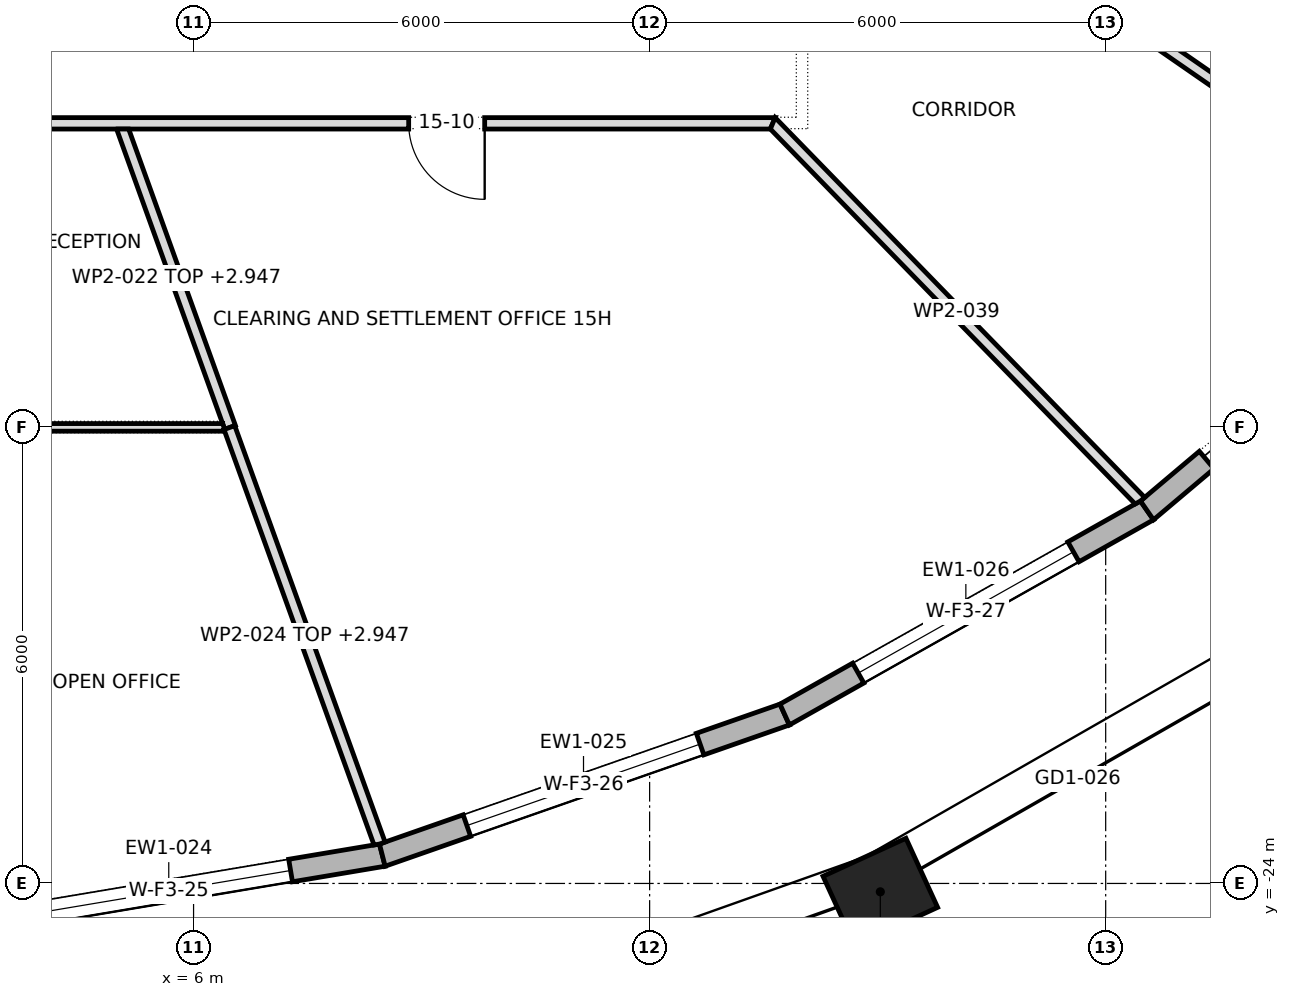
"""IFC4 building model, lengths in metres.
Left out: names, types, materials, properties, quantities, classifications, styles, units other than length and angle.
Written with IfcOpenShell. Run it as: python <this file> out.ifc"""

import sys

from ifc_helpers import new_model, si_unit, direction, frame, frame_2d, origin, origin_2d, place, context, subcontext, project, spatial, polyline, rectangle, outline, extrude, element, fill, save


model = new_model("IFC4")
c1 = context("Model", 3, precision=1e-05, world=origin(), true_north=direction((0.0, 1.0)))
c2 = subcontext(c1, "Body", "Model", "MODEL_VIEW")
j1 = project(units=[si_unit("LENGTHUNIT", "METRE"), si_unit("PLANEANGLEUNIT", "RADIAN")], contexts=[c1])
p1 = place(None, origin())
s1 = spatial("IfcSite", under=j1, at=p1, CompositionType="ELEMENT")
p2 = place(p1, origin())
s2 = spatial("IfcBuilding", under=s1, at=p2, CompositionType="ELEMENT")
p3 = place(p2, frame((0.0, 0.0, 214.9)))
s3 = spatial("IfcBuildingStorey", under=s2, at=p3, CompositionType="ELEMENT", Elevation=214.9)
p4 = place(p3, frame((15.035, -24.11, 0.0), z_axis=(0.0, 0.0, 1.0), x_axis=(0.909129276708, 0.416514055265, 0.0)))
e1 = element("IfcColumn", 1, at=p4, inside=s3, PredefinedType="COLUMN", context=c2, shape_type="SweptSolid", body=[
    extrude(rectangle(XDim=1.2, YDim=1.0, at=origin_2d()), origin(), (0.0, 0.0, 1.0), 4.0),
])
p5 = place(p3, frame((2.864, -24.57, 0.0), z_axis=(0.0, 0.0, 1.0), x_axis=(0.986218486863, 0.16544816762, 0.0)))
e2 = element("IfcWall", 2, at=p5, inside=s3, PredefinedType="STANDARD", context=c2, shape_type="SweptSolid", body=[
    extrude(outline(polyline([(-0.012, -0.15), (5.71, -0.15), (5.685, 0.15), (0.012, 0.15), (-0.012, -0.15)])), origin(), (0.0, 0.0, 1.0), 3.7),
])
p6 = place(p5, frame((1.224, 0.0, 0.6)))
e3 = element("IfcOpeningElement", 3, at=p6, cuts=e2, PredefinedType="OPENING", context=c2, shape_type="SweptSolid", body=[
    extrude(rectangle(XDim=3.25, YDim=2.65, at=frame_2d((1.625, 1.325))), frame((0.0, 0.162, 0.0), z_axis=(0.0, -1.0, 0.0), x_axis=(1.0, 0.0, 0.0)), (0.0, 0.0, 1.0), 0.324),
])
p7 = place(p3, frame((8.483, -23.627, 0.0), z_axis=(0.0, 0.0, 1.0), x_axis=(0.944053670735, 0.329791853708, 0.0)))
e4 = element("IfcWall", 4, at=p7, inside=s3, PredefinedType="STANDARD", context=c2, shape_type="SweptSolid", body=[
    extrude(outline(polyline([(-0.013, -0.15), (5.621, -0.15), (5.594, 0.15), (0.013, 0.15), (-0.013, -0.15)])), origin(), (0.0, 0.0, 1.0), 3.7),
])
p8 = place(p7, frame((1.179, 0.0, 0.6)))
e5 = element("IfcOpeningElement", 5, at=p8, cuts=e4, PredefinedType="OPENING", context=c2, shape_type="SweptSolid", body=[
    extrude(rectangle(XDim=3.25, YDim=2.65, at=frame_2d((1.625, 1.325))), frame((0.0, 0.162, 0.0), z_axis=(0.0, -1.0, 0.0), x_axis=(1.0, 0.0, 0.0)), (0.0, 0.0, 1.0), 0.324),
])
p9 = place(p3, frame((13.777, -21.778, 0.0), z_axis=(0.0, 0.0, 1.0), x_axis=(0.871207038577, 0.490915772749, 0.0)))
e6 = element("IfcWall", 6, at=p9, inside=s3, PredefinedType="STANDARD", context=c2, shape_type="SweptSolid", body=[
    extrude(outline(polyline([(-0.013, -0.15), (5.485, -0.15), (5.457, 0.15), (0.013, 0.15), (-0.013, -0.15)])), origin(), (0.0, 0.0, 1.0), 3.7),
])
p10 = place(p9, frame((1.111, 0.0, 0.6)))
e7 = element("IfcOpeningElement", 7, at=p10, cuts=e6, PredefinedType="OPENING", context=c2, shape_type="SweptSolid", body=[
    extrude(rectangle(XDim=3.25, YDim=2.65, at=frame_2d((1.625, 1.325))), frame((0.0, 0.162, 0.0), z_axis=(0.0, -1.0, 0.0), x_axis=(1.0, 0.0, 0.0)), (0.0, 0.0, 1.0), 0.324),
])
p11 = place(p3, frame((18.543, -19.092, 0.0), z_axis=(0.0, 0.0, 1.0), x_axis=(0.764397795062, 0.644744919255, 0.0)))
e8 = element("IfcWall", 8, at=p11, inside=s3, PredefinedType="STANDARD", context=c2, shape_type="SweptSolid", body=[
    extrude(outline(polyline([(-0.014, -0.15), (5.32, -0.15), (5.29, 0.15), (0.014, 0.15), (-0.014, -0.15)])), origin(), (0.0, 0.0, 1.0), 3.7),
])
p12 = place(p11, frame((1.028, 0.0, 0.0)))
e9 = element("IfcOpeningElement", 9, at=p12, cuts=e8, PredefinedType="OPENING", context=c2, shape_type="SweptSolid", body=[
    extrude(rectangle(XDim=3.25, YDim=3.25, at=frame_2d((1.625, 1.625))), frame((0.0, 0.162, 0.0), z_axis=(0.0, -1.0, 0.0), x_axis=(1.0, 0.0, 0.0)), (0.0, 0.0, 1.0), 0.324),
])
p13 = place(p3, frame((-13.652, -14.0, 0.0), z_axis=(0.0, 0.0, 1.0), x_axis=(1.0, 0.0, 0.0)))
e10 = element("IfcWall", 10, at=p13, inside=s3, PredefinedType="PARTITIONING", context=c2, shape_type="SweptSolid", body=[
    extrude(outline(polyline([(0.063, -0.075), (2.004, -0.075), (3.946, -0.075), (5.887, -0.075), (7.828, -0.075), (9.769, -0.075), (11.71, -0.075), (13.652, -0.075), (15.593, -0.075), (17.534, -0.075), (19.475, -0.075), (21.417, -0.075), (23.358, -0.075), (25.299, -0.075), (27.24, -0.075), (27.303, 0.075), (27.303, 0.075), (25.353, 0.075), (23.403, 0.075), (21.453, 0.075), (19.502, 0.075), (17.552, 0.075), (15.602, 0.075), (13.652, 0.075), (11.701, 0.075), (9.751, 0.075), (7.801, 0.075), (5.851, 0.075), (3.9, 0.075), (1.95, 0.075), (0.0, 0.075), (0.0, 0.075), (0.063, -0.075)])), origin(), (0.0, 0.0, 1.0), 3.7),
])
p14 = place(p13, frame((5.527, 0.0, 0.0)))
e11 = element("IfcOpeningElement", 11, at=p14, cuts=e10, PredefinedType="OPENING", context=c2, shape_type="SweptSolid", body=[
    extrude(rectangle(XDim=1.0, YDim=2.1, at=frame_2d((0.5, 1.05))), frame((0.0, 0.087, 0.0), z_axis=(0.0, -1.0, 0.0), x_axis=(1.0, 0.0, 0.0)), (0.0, 0.0, 1.0), 0.174),
])
p15 = place(p13, frame((14.857, 0.0, 0.0)))
e12 = element("IfcOpeningElement", 12, at=p15, cuts=e10, PredefinedType="OPENING", context=c2, shape_type="SweptSolid", body=[
    extrude(rectangle(XDim=1.0, YDim=2.1, at=frame_2d((0.5, 1.05))), frame((0.0, 0.087, 0.0), z_axis=(0.0, -1.0, 0.0), x_axis=(1.0, 0.0, 0.0)), (0.0, 0.0, 1.0), 0.174),
])
p16 = place(p13, frame((22.482, 0.0, 0.0)))
e13 = element("IfcOpeningElement", 13, at=p16, cuts=e10, PredefinedType="OPENING", context=c2, shape_type="SweptSolid", body=[
    extrude(rectangle(XDim=1.0, YDim=2.1, at=frame_2d((0.5, 1.05))), frame((0.0, 0.087, 0.0), z_axis=(0.0, -1.0, 0.0), x_axis=(1.0, 0.0, 0.0)), (0.0, 0.0, 1.0), 0.174),
])
p17 = place(p3, frame((5.058, -14.05, 0.0), z_axis=(0.0, 0.0, 1.0), x_axis=(0.338678283686, -0.940902237302, 0.0)))
e14 = element("IfcWall", 14, at=p17, inside=s3, PredefinedType="PARTITIONING", context=c2, shape_type="SweptSolid", body=[
    extrude(outline(polyline([(0.0, -0.075), (1.373, -0.075), (2.745, -0.075), (4.118, -0.075), (4.118, -0.075), (4.119, -0.075), (4.198, -0.075), (4.198, 0.075), (2.817, 0.075), (1.435, 0.075), (0.054, 0.075), (0.0, -0.074), (0.0, -0.075)])), origin(), (0.0, 0.0, 1.0), 2.947),
])
p18 = place(p3, frame((6.408, -18.0, 0.0), z_axis=(0.0, 0.0, 1.0), x_axis=(-1.0, 0.0, 0.0)))
e15 = element("IfcWall", 15, at=p18, inside=s3, PredefinedType="PARTITIONING", context=c2, shape_type="SweptSolid", body=[
    extrude(outline(polyline([(0.026, -0.05), (1.706, -0.05), (3.386, -0.05), (5.066, -0.05), (6.746, -0.05), (8.427, -0.05), (8.438, 0.047), (8.438, 0.05), (6.75, 0.05), (5.063, 0.05), (3.375, 0.05), (1.688, 0.05), (0.0, 0.05), (0.0, 0.049), (0.007, 0.03), (0.0, 0.028), (0.0, 0.021), (0.026, -0.05)])), origin(), (0.0, 0.0, 1.0), 3.7),
])
p19 = place(p18, frame((3.773, 0.0, 0.0)))
e16 = element("IfcOpeningElement", 16, at=p19, cuts=e15, PredefinedType="OPENING", context=c2, shape_type="SweptSolid", body=[
    extrude(rectangle(XDim=0.9, YDim=2.1, at=frame_2d((0.45, 1.05))), frame((0.0, 0.062, 0.0), z_axis=(0.0, -1.0, 0.0), x_axis=(1.0, 0.0, 0.0)), (0.0, 0.0, 1.0), 0.124),
])
p20 = place(p3, frame((6.471, -18.003, 0.0), z_axis=(0.0, 0.0, 1.0), x_axis=(0.339648584393, -0.940552411681, 0.0)))
e17 = element("IfcWall", 17, at=p20, inside=s3, PredefinedType="PARTITIONING", context=c2, shape_type="SweptSolid", body=[
    extrude(outline(polyline([(0.021, -0.075), (1.951, -0.075), (3.881, -0.075), (5.81, -0.075), (5.823, -0.004), (5.824, 0.043), (5.824, 0.075), (3.883, 0.075), (1.941, 0.075), (0.0, 0.075), (0.0, -0.067), (0.021, -0.075)])), origin(), (0.0, 0.0, 1.0), 2.947),
])
p21 = place(p3, frame((13.968, -9.667, 0.0), z_axis=(0.0, 0.0, 1.0), x_axis=(0.822219313141, -0.56917080134, 0.0)))
e18 = element("IfcWall", 18, at=p21, inside=s3, PredefinedType="PARTITIONING", context=c2, shape_type="SweptSolid", body=[
    extrude(outline(polyline([(0.0, -0.075), (1.724, -0.075), (3.448, -0.075), (5.173, -0.075), (6.897, -0.075), (8.621, -0.075), (10.345, -0.075), (10.365, 0.0), (10.37, 0.066), (10.37, 0.075), (8.511, 0.075), (6.653, 0.075), (4.795, 0.075), (4.792, 0.073), (4.791, 0.075), (3.22, 0.075), (1.65, 0.075), (0.079, 0.075), (0.039, -0.0), (0.0, -0.075)])), origin(), (0.0, 0.0, 1.0), 2.947),
])
p22 = place(p3, frame((18.459, -18.973, 0.0), z_axis=(0.0, 0.0, 1.0), x_axis=(-0.697374409368, 0.716707006494, 0.0)))
e19 = element("IfcWall", 19, at=p22, inside=s3, PredefinedType="PARTITIONING", context=c2, shape_type="SweptSolid", body=[
    extrude(outline(polyline([(0.0, -0.075), (1.743, -0.075), (3.485, -0.075), (5.228, -0.075), (6.971, -0.075), (6.939, 0.0), (6.907, 0.075), (5.187, 0.075), (3.466, 0.075), (1.746, 0.075), (0.025, 0.075), (0.005, -0.002), (0.0, -0.069), (0.0, -0.075)])), origin(), (0.0, 0.0, 1.0), 3.7),
])
p23 = place(p6, origin())
e20 = element("IfcWindow", 20, at=p23, inside=s3, PartitioningType="TRIPLE_PANEL_VERTICAL", PredefinedType="WINDOW", context=c2, shape_type="SweptSolid", body=[
    extrude(rectangle(XDim=3.25, YDim=2.65, at=frame_2d((1.625, 1.325))), frame((0.0, 0.03, 0.0), z_axis=(0.0, -1.0, 0.0), x_axis=(1.0, 0.0, 0.0)), (0.0, 0.0, 1.0), 0.06),
])
fill(e3, e20)
p24 = place(p8, origin())
e21 = element("IfcWindow", 21, at=p24, inside=s3, PartitioningType="TRIPLE_PANEL_VERTICAL", PredefinedType="WINDOW", context=c2, shape_type="SweptSolid", body=[
    extrude(rectangle(XDim=3.25, YDim=2.65, at=frame_2d((1.625, 1.325))), frame((0.0, 0.03, 0.0), z_axis=(0.0, -1.0, 0.0), x_axis=(1.0, 0.0, 0.0)), (0.0, 0.0, 1.0), 0.06),
])
fill(e5, e21)
p25 = place(p10, origin())
e22 = element("IfcWindow", 22, at=p25, inside=s3, PartitioningType="TRIPLE_PANEL_VERTICAL", PredefinedType="WINDOW", context=c2, shape_type="SweptSolid", body=[
    extrude(rectangle(XDim=3.25, YDim=2.65, at=frame_2d((1.625, 1.325))), frame((0.0, 0.03, 0.0), z_axis=(0.0, -1.0, 0.0), x_axis=(1.0, 0.0, 0.0)), (0.0, 0.0, 1.0), 0.06),
])
fill(e7, e22)
p26 = place(p12, origin())
e23 = element("IfcDoor", 23, at=p26, inside=s3, OperationType="DOUBLE_DOOR_SLIDING", PredefinedType="DOOR", context=c2, shape_type="SweptSolid", body=[
    extrude(rectangle(XDim=3.25, YDim=3.25, at=frame_2d((1.625, 1.625))), frame((0.0, 0.025, 0.0), z_axis=(0.0, -1.0, 0.0), x_axis=(1.0, 0.0, 0.0)), (0.0, 0.0, 1.0), 0.05),
])
fill(e9, e23)
p27 = place(p16, frame((1.0, 0.0, 0.0), z_axis=(0.0, 0.0, 1.0), x_axis=(-1.0, 0.0, 0.0)))
e24 = element("IfcDoor", 24, at=p27, inside=s3, OperationType="SINGLE_SWING_RIGHT", PredefinedType="DOOR", context=c2, shape_type="SweptSolid", body=[
    extrude(rectangle(XDim=1.0, YDim=2.1, at=frame_2d((0.5, 1.05))), frame((0.0, 0.025, 0.0), z_axis=(0.0, -1.0, 0.0), x_axis=(1.0, 0.0, 0.0)), (0.0, 0.0, 1.0), 0.05),
])
fill(e13, e24)
save(model, sys.argv[1])
